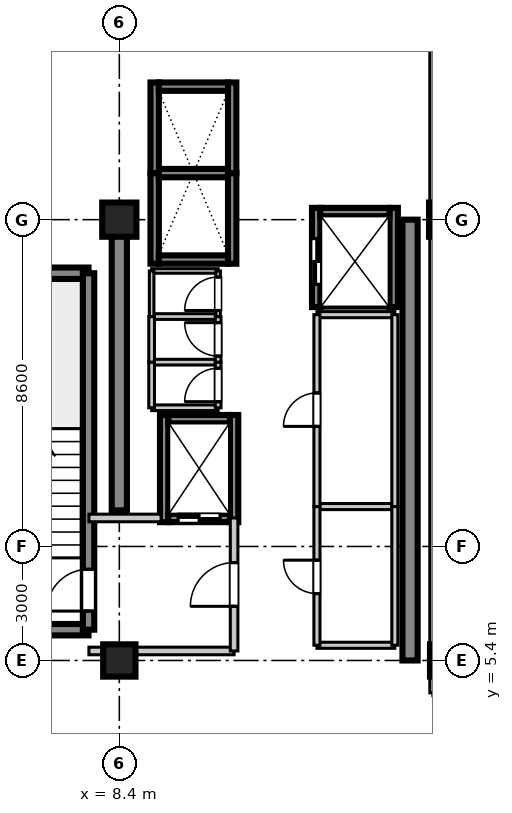
"""IFC4 building model, lengths in metres.
Left out: names, types, materials, properties, quantities, classifications, styles, units other than length and angle.
Written with IfcOpenShell. Run it as: python <this file> out.ifc"""

import sys

from ifc_helpers import new_model, si_unit, direction, frame, frame_2d, origin, origin_2d, place, context, subcontext, project, spatial, rectangle, extrude, source, transform, mapped, element, fill, save


model = new_model("IFC4")
c1 = context("Model", 3, precision=1e-05, world=origin(), true_north=direction((0.0, 1.0)))
c2 = subcontext(c1, "Body", "Model", "MODEL_VIEW")
j1 = project(units=[si_unit("LENGTHUNIT", "METRE"), si_unit("PLANEANGLEUNIT", "RADIAN")], contexts=[c1])
p1 = place(None, origin())
s1 = spatial("IfcSite", under=j1, at=p1, CompositionType="ELEMENT")
p2 = place(p1, origin())
s2 = spatial("IfcBuilding", under=s1, at=p2, CompositionType="ELEMENT")
p3 = place(p2, frame((0.0, 0.0, 327.15)))
s3 = spatial("IfcBuildingStorey", under=s2, at=p3, CompositionType="ELEMENT", Elevation=327.15)
m1 = source(origin(), c2, "Body", "SweptSolid", [
    extrude(rectangle(XDim=0.85, YDim=0.85, at=origin_2d()), origin(), (0.0, 0.0, 1.0), 3.755),
])
p4 = place(p3, frame((8.4, 5.4, 0.0), z_axis=(0.0, 0.0, 1.0), x_axis=(1.0, 0.0, 0.0)))
e1 = element("IfcColumn", 1, at=p4, inside=s3, PredefinedType="PILASTER", context=c2, shape_type="MappedRepresentation", body=[
    mapped(m1, transform((0.0, 0.0, 0.0), scale=1.0)),
])
m2 = source(origin(), c2, "Body", "SweptSolid", [
    extrude(rectangle(XDim=0.9, YDim=0.9, at=origin_2d()), origin(), (0.0, 0.0, 1.0), 3.755),
])
p5 = place(p3, frame((8.4, 17.0, 0.0), z_axis=(0.0, 0.0, 1.0), x_axis=(1.0, 0.0, 0.0)))
e2 = element("IfcColumn", 2, at=p5, inside=s3, PredefinedType="COLUMN", context=c2, shape_type="MappedRepresentation", body=[
    mapped(m2, transform((0.0, 0.0, 0.0), scale=1.0)),
])
p6 = place(p3, frame((17.0, 5.4, 0.0), z_axis=(0.0, 0.0, 1.0), x_axis=(1.0, 0.0, 0.0)))
e3 = element("IfcColumn", 3, at=p6, inside=s3, PredefinedType="PILASTER", context=c2, shape_type="MappedRepresentation", body=[
    mapped(m1, transform((0.0, 0.0, 0.0), scale=1.0)),
])
p7 = place(p3, frame((17.0, 17.0, 0.0), z_axis=(0.0, 0.0, 1.0), x_axis=(1.0, 0.0, 0.0)))
e4 = element("IfcColumn", 4, at=p7, inside=s3, PredefinedType="COLUMN", context=c2, shape_type="MappedRepresentation", body=[
    mapped(m2, transform((0.0, 0.0, 0.0), scale=1.0)),
])
m3 = source(origin(), c2, "Body", "SweptSolid", [
    extrude(rectangle(XDim=7.65, YDim=0.4, at=frame_2d((3.825, 0.0))), origin(), (0.0, 0.0, 1.0), 3.5),
])
p8 = place(p3, frame((8.4, 9.35, 0.0), z_axis=(0.0, 0.0, 1.0), x_axis=(0.0, 1.0, 0.0)))
e5 = element("IfcWall", 5, at=p8, inside=s3, PredefinedType="SHEAR", context=c2, shape_type="MappedRepresentation", body=[
    mapped(m3, transform((0.0, 0.0, 0.0), scale=1.0)),
])
m4 = source(origin(), c2, "Body", "SweptSolid", [
    extrude(rectangle(XDim=11.6, YDim=0.4, at=frame_2d((5.8, 0.0))), origin(), (0.0, 0.0, 1.0), 3.5),
])
p9 = place(p3, frame((16.05, 5.4, 0.0), z_axis=(0.0, 0.0, 1.0), x_axis=(0.0, 1.0, 0.0)))
e6 = element("IfcWall", 6, at=p9, inside=s3, PredefinedType="SHEAR", context=c2, shape_type="MappedRepresentation", body=[
    mapped(m4, transform((0.0, 0.0, 0.0), scale=1.0)),
])
m5 = source(origin(), c2, "Body", "SweptSolid", [
    extrude(rectangle(XDim=3.98, YDim=0.3, at=frame_2d((1.99, 0.0))), origin(), (0.0, 0.0, 1.0), 3.5),
])
for number, where, z_axis, x_axis in (
    (7, (3.61, 6.21, 0.0), (0.0, 0.0, 1.0), (1.0, 0.0, 0.0)),
    (8, (3.61, 15.59, 0.0), (0.0, 0.0, 1.0), (1.0, 0.0, 0.0)),
):
    element("IfcWall", number, at=place(p3, frame(where, z_axis=z_axis, x_axis=x_axis)), inside=s3, PredefinedType="SHEAR", context=c2, shape_type="MappedRepresentation", body=[
        mapped(m5, transform((0.0, 0.0, 0.0), scale=1.0)),
    ])
m6 = source(origin(), c2, "Body", "SweptSolid", [
    extrude(rectangle(XDim=9.38, YDim=0.3, at=frame_2d((4.69, 0.0))), origin(), (0.0, 0.0, 1.0), 3.5),
])
p10 = place(p3, frame((7.59, 6.21, 0.0), z_axis=(0.0, 0.0, 1.0), x_axis=(0.0, 1.0, 0.0)))
e9 = element("IfcWall", 9, at=p10, inside=s3, PredefinedType="SHEAR", context=c2, shape_type="MappedRepresentation", body=[
    mapped(m6, transform((0.0, 0.0, 0.0), scale=1.0)),
])
p11 = place(p10, frame((0.49, 0.0, 0.0)))
e10 = element("IfcOpeningElement", 10, at=p11, cuts=e9, PredefinedType="OPENING", context=c2, shape_type="SweptSolid", body=[
    extrude(rectangle(XDim=1.1, YDim=2.15, at=frame_2d((0.55, 1.075))), frame((0.0, 0.16, 0.0), z_axis=(0.0, -1.0, 0.0), x_axis=(1.0, 0.0, 0.0)), (0.0, 0.0, 1.0), 0.32),
])
m7 = source(origin(), c2, "Body", "SweptSolid", [
    extrude(rectangle(XDim=2.385, YDim=0.22, at=frame_2d((1.192, 0.0))), origin(), (0.0, 0.0, 1.0), 3.5),
])
for number, where, z_axis, x_axis in (
    (11, (9.33, 15.84, 0.0), (0.0, 0.0, 1.0), (0.0, 1.0, 0.0)),
    (12, (11.37, 15.84, 0.0), (0.0, 0.0, 1.0), (0.0, 1.0, 0.0)),
):
    element("IfcWall", number, at=place(p3, frame(where, z_axis=z_axis, x_axis=x_axis)), inside=s3, PredefinedType="SHEAR", context=c2, shape_type="MappedRepresentation", body=[
        mapped(m7, transform((0.0, 0.0, 0.0), scale=1.0)),
    ])
m8 = source(origin(), c2, "Body", "SweptSolid", [
    extrude(rectangle(XDim=1.82, YDim=0.22, at=frame_2d((0.91, 0.0))), origin(), (0.0, 0.0, 1.0), 3.5),
])
p12 = place(p3, frame((9.44, 15.95, 0.0), z_axis=(0.0, 0.0, 1.0), x_axis=(1.0, 0.0, 0.0)))
e13 = element("IfcWall", 13, at=p12, inside=s3, PredefinedType="SHEAR", context=c2, shape_type="MappedRepresentation", body=[
    mapped(m8, transform((0.0, 0.0, 0.0), scale=1.0)),
])
m9 = source(origin(), c2, "Body", "SweptSolid", [
    extrude(rectangle(XDim=1.82, YDim=0.22, at=frame_2d((0.91, 0.0))), origin(), (0.0, 0.0, 1.0), 3.8),
])
p13 = place(p3, frame((9.44, 18.225, 0.0), z_axis=(0.0, 0.0, 1.0), x_axis=(1.0, 0.0, 0.0)))
e14 = element("IfcWall", 14, at=p13, inside=s3, PredefinedType="SHEAR", context=c2, shape_type="MappedRepresentation", body=[
    mapped(m9, transform((0.0, 0.0, 0.0), scale=1.0)),
])
for number, where, z_axis, x_axis in (
    (15, (9.33, 18.225, 0.0), (0.0, 0.0, 1.0), (0.0, 1.0, 0.0)),
    (16, (11.37, 18.225, 0.0), (0.0, 0.0, 1.0), (0.0, 1.0, 0.0)),
):
    element("IfcWall", number, at=place(p3, frame(where, z_axis=z_axis, x_axis=x_axis)), inside=s3, PredefinedType="SHEAR", context=c2, shape_type="MappedRepresentation", body=[
        mapped(m7, transform((0.0, 0.0, 0.0), scale=1.0)),
    ])
p14 = place(p3, frame((9.44, 20.5, 0.0), z_axis=(0.0, 0.0, 1.0), x_axis=(1.0, 0.0, 0.0)))
e17 = element("IfcWall", 17, at=p14, inside=s3, PredefinedType="SHEAR", context=c2, shape_type="MappedRepresentation", body=[
    mapped(m8, transform((0.0, 0.0, 0.0), scale=1.0)),
])
m10 = source(origin(), c2, "Body", "SweptSolid", [
    extrude(rectangle(XDim=2.82, YDim=0.22, at=frame_2d((1.41, 0.0))), origin(), (0.0, 0.0, 1.0), 3.5),
])
for number, where, z_axis, x_axis in (
    (18, (9.58, 9.04, 0.0), (0.0, 0.0, 1.0), (0.0, 1.0, 0.0)),
    (19, (11.42, 9.04, 0.0), (0.0, 0.0, 1.0), (0.0, 1.0, 0.0)),
):
    element("IfcWall", number, at=place(p3, frame(where, z_axis=z_axis, x_axis=x_axis)), inside=s3, PredefinedType="SHEAR", context=c2, shape_type="MappedRepresentation", body=[
        mapped(m10, transform((0.0, 0.0, 0.0), scale=1.0)),
    ])
m11 = source(origin(), c2, "Body", "SweptSolid", [
    extrude(rectangle(XDim=1.62, YDim=0.22, at=frame_2d((0.81, 0.0))), origin(), (0.0, 0.0, 1.0), 3.5),
])
p15 = place(p3, frame((9.69, 9.15, 0.0), z_axis=(0.0, 0.0, 1.0), x_axis=(1.0, 0.0, 0.0)))
e20 = element("IfcWall", 20, at=p15, inside=s3, PredefinedType="SHEAR", context=c2, shape_type="MappedRepresentation", body=[
    mapped(m11, transform((0.0, 0.0, 0.0), scale=1.0)),
])
p16 = place(p15, frame((0.26, 0.0, 0.0)))
e21 = element("IfcOpeningElement", 21, at=p16, cuts=e20, PredefinedType="OPENING", context=c2, shape_type="SweptSolid", body=[
    extrude(rectangle(XDim=1.1, YDim=2.2, at=frame_2d((0.55, 1.1))), frame((0.0, 0.12, 0.0), z_axis=(0.0, -1.0, 0.0), x_axis=(1.0, 0.0, 0.0)), (0.0, 0.0, 1.0), 0.24),
])
p17 = place(p3, frame((9.69, 11.75, 0.0), z_axis=(0.0, 0.0, 1.0), x_axis=(1.0, 0.0, 0.0)))
e22 = element("IfcWall", 22, at=p17, inside=s3, PredefinedType="SHEAR", context=c2, shape_type="MappedRepresentation", body=[
    mapped(m11, transform((0.0, 0.0, 0.0), scale=1.0)),
])
m12 = source(origin(), c2, "Body", "SweptSolid", [
    extrude(rectangle(XDim=2.61, YDim=0.22, at=frame_2d((1.305, 0.0))), origin(), (0.0, 0.0, 1.0), 3.5),
])
p18 = place(p3, frame((13.58, 14.7, 0.0), z_axis=(0.0, 0.0, 1.0), x_axis=(0.0, 1.0, 0.0)))
e23 = element("IfcWall", 23, at=p18, inside=s3, PredefinedType="SHEAR", context=c2, shape_type="MappedRepresentation", body=[
    mapped(m12, transform((0.0, 0.0, 0.0), scale=1.0)),
])
p19 = place(p18, frame((0.6, 0.0, 0.0)))
e24 = element("IfcOpeningElement", 24, at=p19, cuts=e23, PredefinedType="OPENING", context=c2, shape_type="SweptSolid", body=[
    extrude(rectangle(XDim=1.2, YDim=2.2, at=frame_2d((0.6, 1.1))), frame((0.0, 0.12, 0.0), z_axis=(0.0, -1.0, 0.0), x_axis=(1.0, 0.0, 0.0)), (0.0, 0.0, 1.0), 0.24),
])
p20 = place(p3, frame((15.62, 14.7, 0.0), z_axis=(0.0, 0.0, 1.0), x_axis=(0.0, 1.0, 0.0)))
e25 = element("IfcWall", 25, at=p20, inside=s3, PredefinedType="SHEAR", context=c2, shape_type="MappedRepresentation", body=[
    mapped(m12, transform((0.0, 0.0, 0.0), scale=1.0)),
])
p21 = place(p3, frame((13.69, 17.2, 0.0), z_axis=(0.0, 0.0, 1.0), x_axis=(1.0, 0.0, 0.0)))
e26 = element("IfcWall", 26, at=p21, inside=s3, PredefinedType="SHEAR", context=c2, shape_type="MappedRepresentation", body=[
    mapped(m8, transform((0.0, 0.0, 0.0), scale=1.0)),
])
m13 = source(origin(), c2, "Body", "SweptSolid", [
    extrude(rectangle(XDim=3.82, YDim=0.2, at=frame_2d((1.91, 0.0))), origin(), (0.0, 0.0, 1.0), 2.84),
])
p22 = place(p3, frame((7.6, 5.65, 0.0), z_axis=(0.0, 0.0, 1.0), x_axis=(1.0, 0.0, 0.0)))
e27 = element("IfcWall", 27, at=p22, inside=s3, PredefinedType="PARTITIONING", context=c2, shape_type="MappedRepresentation", body=[
    mapped(m13, transform((0.0, 0.0, 0.0), scale=1.0)),
])
m14 = source(origin(), c2, "Body", "SweptSolid", [
    extrude(rectangle(XDim=1.9, YDim=0.2, at=frame_2d((0.95, 0.0))), origin(), (0.0, 0.0, 1.0), 2.84),
])
p23 = place(p3, frame((7.6, 9.15, 0.0), z_axis=(0.0, 0.0, 1.0), x_axis=(1.0, 0.0, 0.0)))
e28 = element("IfcWall", 28, at=p23, inside=s3, PredefinedType="PARTITIONING", context=c2, shape_type="MappedRepresentation", body=[
    mapped(m14, transform((0.0, 0.0, 0.0), scale=1.0)),
])
m15 = source(origin(), c2, "Body", "SweptSolid", [
    extrude(rectangle(XDim=3.5, YDim=0.2, at=frame_2d((1.75, 0.0))), origin(), (0.0, 0.0, 1.0), 2.84),
])
p24 = place(p3, frame((11.42, 5.65, 0.0), z_axis=(0.0, 0.0, 1.0), x_axis=(0.0, 1.0, 0.0)))
e29 = element("IfcWall", 29, at=p24, inside=s3, PredefinedType="PARTITIONING", context=c2, shape_type="MappedRepresentation", body=[
    mapped(m15, transform((0.0, 0.0, 0.0), scale=1.0)),
])
p25 = place(p24, frame((1.175, 0.0, 0.0)))
e30 = element("IfcOpeningElement", 30, at=p25, cuts=e29, PredefinedType="OPENING", context=c2, shape_type="SweptSolid", body=[
    extrude(rectangle(XDim=1.15, YDim=2.15, at=frame_2d((0.575, 1.075))), frame((0.0, 0.11, 0.0), z_axis=(0.0, -1.0, 0.0), x_axis=(1.0, 0.0, 0.0)), (0.0, 0.0, 1.0), 0.22),
])
m16 = source(origin(), c2, "Body", "SweptSolid", [
    extrude(rectangle(XDim=1.75, YDim=0.15, at=frame_2d((0.875, 0.0))), origin(), (0.0, 0.0, 1.0), 2.84),
])
for number, where, z_axis, x_axis in (
    (31, (9.25, 12.05, 0.0), (0.0, 0.0, 1.0), (1.0, 0.0, 0.0)),
    (32, (9.25, 13.25, 0.0), (0.0, 0.0, 1.0), (1.0, 0.0, 0.0)),
):
    element("IfcWall", number, at=place(p3, frame(where, z_axis=z_axis, x_axis=x_axis)), inside=s3, PredefinedType="PARTITIONING", context=c2, shape_type="MappedRepresentation", body=[
        mapped(m16, transform((0.0, 0.0, 0.0), scale=1.0)),
    ])
m17 = source(origin(), c2, "Body", "SweptSolid", [
    extrude(rectangle(XDim=1.2, YDim=0.15, at=frame_2d((0.6, 0.0))), origin(), (0.0, 0.0, 1.0), 2.84),
])
p26 = place(p3, frame((9.25, 12.05, 0.0), z_axis=(0.0, 0.0, 1.0), x_axis=(0.0, 1.0, 0.0)))
e33 = element("IfcWall", 33, at=p26, inside=s3, PredefinedType="PARTITIONING", context=c2, shape_type="MappedRepresentation", body=[
    mapped(m17, transform((0.0, 0.0, 0.0), scale=1.0)),
])
p27 = place(p3, frame((11.0, 12.05, 0.0), z_axis=(0.0, 0.0, 1.0), x_axis=(0.0, 1.0, 0.0)))
e34 = element("IfcWall", 34, at=p27, inside=s3, PredefinedType="PARTITIONING", context=c2, shape_type="MappedRepresentation", body=[
    mapped(m17, transform((0.0, 0.0, 0.0), scale=1.0)),
])
p28 = place(p27, frame((0.16, 0.0, 0.0)))
e35 = element("IfcOpeningElement", 35, at=p28, cuts=e34, PredefinedType="OPENING", context=c2, shape_type="SweptSolid", body=[
    extrude(rectangle(XDim=0.88, YDim=2.1, at=frame_2d((0.44, 1.05))), frame((0.0, 0.085, 0.0), z_axis=(0.0, -1.0, 0.0), x_axis=(1.0, 0.0, 0.0)), (0.0, 0.0, 1.0), 0.17),
])
p29 = place(p3, frame((9.25, 14.45, 0.0), z_axis=(0.0, 0.0, 1.0), x_axis=(1.0, 0.0, 0.0)))
e36 = element("IfcWall", 36, at=p29, inside=s3, PredefinedType="PARTITIONING", context=c2, shape_type="MappedRepresentation", body=[
    mapped(m16, transform((0.0, 0.0, 0.0), scale=1.0)),
])
p30 = place(p3, frame((9.25, 13.25, 0.0), z_axis=(0.0, 0.0, 1.0), x_axis=(0.0, 1.0, 0.0)))
e37 = element("IfcWall", 37, at=p30, inside=s3, PredefinedType="PARTITIONING", context=c2, shape_type="MappedRepresentation", body=[
    mapped(m17, transform((0.0, 0.0, 0.0), scale=1.0)),
])
p31 = place(p3, frame((11.0, 13.25, 0.0), z_axis=(0.0, 0.0, 1.0), x_axis=(0.0, 1.0, 0.0)))
e38 = element("IfcWall", 38, at=p31, inside=s3, PredefinedType="PARTITIONING", context=c2, shape_type="MappedRepresentation", body=[
    mapped(m17, transform((0.0, 0.0, 0.0), scale=1.0)),
])
p32 = place(p31, frame((0.16, 0.0, 0.0)))
e39 = element("IfcOpeningElement", 39, at=p32, cuts=e38, PredefinedType="OPENING", context=c2, shape_type="SweptSolid", body=[
    extrude(rectangle(XDim=0.88, YDim=2.1, at=frame_2d((0.44, 1.05))), frame((0.0, 0.085, 0.0), z_axis=(0.0, -1.0, 0.0), x_axis=(1.0, 0.0, 0.0)), (0.0, 0.0, 1.0), 0.17),
])
m18 = source(origin(), c2, "Body", "SweptSolid", [
    extrude(rectangle(XDim=1.75, YDim=0.12, at=frame_2d((0.875, 0.0))), origin(), (0.0, 0.0, 1.0), 2.84),
])
p33 = place(p3, frame((9.25, 15.65, 0.0), z_axis=(0.0, 0.0, 1.0), x_axis=(1.0, 0.0, 0.0)))
e40 = element("IfcWall", 40, at=p33, inside=s3, PredefinedType="PARTITIONING", context=c2, shape_type="MappedRepresentation", body=[
    mapped(m18, transform((0.0, 0.0, 0.0), scale=1.0)),
])
m19 = source(origin(), c2, "Body", "SweptSolid", [
    extrude(rectangle(XDim=1.2, YDim=0.12, at=frame_2d((0.6, 0.0))), origin(), (0.0, 0.0, 1.0), 2.84),
])
p34 = place(p3, frame((9.25, 14.45, 0.0), z_axis=(0.0, 0.0, 1.0), x_axis=(0.0, 1.0, 0.0)))
e41 = element("IfcWall", 41, at=p34, inside=s3, PredefinedType="PARTITIONING", context=c2, shape_type="MappedRepresentation", body=[
    mapped(m19, transform((0.0, 0.0, 0.0), scale=1.0)),
])
p35 = place(p3, frame((11.0, 14.45, 0.0), z_axis=(0.0, 0.0, 1.0), x_axis=(0.0, 1.0, 0.0)))
e42 = element("IfcWall", 42, at=p35, inside=s3, PredefinedType="PARTITIONING", context=c2, shape_type="MappedRepresentation", body=[
    mapped(m19, transform((0.0, 0.0, 0.0), scale=1.0)),
])
p36 = place(p35, frame((0.16, 0.0, 0.0)))
e43 = element("IfcOpeningElement", 43, at=p36, cuts=e42, PredefinedType="OPENING", context=c2, shape_type="SweptSolid", body=[
    extrude(rectangle(XDim=0.88, YDim=2.1, at=frame_2d((0.44, 1.05))), frame((0.0, 0.07, 0.0), z_axis=(0.0, -1.0, 0.0), x_axis=(1.0, 0.0, 0.0)), (0.0, 0.0, 1.0), 0.14),
])
m20 = source(origin(), c2, "Body", "SweptSolid", [
    extrude(rectangle(XDim=2.05, YDim=0.16, at=frame_2d((1.025, 0.0))), origin(), (0.0, 0.0, 1.0), 2.84),
])
for number, where, z_axis, x_axis in (
    (44, (13.6, 5.8, 0.0), (0.0, 0.0, 1.0), (1.0, 0.0, 0.0)),
    (45, (13.6, 9.45, 0.0), (0.0, 0.0, 1.0), (1.0, 0.0, 0.0)),
):
    element("IfcWall", number, at=place(p3, frame(where, z_axis=z_axis, x_axis=x_axis)), inside=s3, PredefinedType="PARTITIONING", context=c2, shape_type="MappedRepresentation", body=[
        mapped(m20, transform((0.0, 0.0, 0.0), scale=1.0)),
    ])
m21 = source(origin(), c2, "Body", "SweptSolid", [
    extrude(rectangle(XDim=3.65, YDim=0.16, at=frame_2d((1.825, 0.0))), origin(), (0.0, 0.0, 1.0), 2.84),
])
p37 = place(p3, frame((13.6, 5.8, 0.0), z_axis=(0.0, 0.0, 1.0), x_axis=(0.0, 1.0, 0.0)))
e46 = element("IfcWall", 46, at=p37, inside=s3, PredefinedType="PARTITIONING", context=c2, shape_type="MappedRepresentation", body=[
    mapped(m21, transform((0.0, 0.0, 0.0), scale=1.0)),
])
p38 = place(p37, frame((1.36, 0.0, 0.0)))
e47 = element("IfcOpeningElement", 47, at=p38, cuts=e46, PredefinedType="OPENING", context=c2, shape_type="SweptSolid", body=[
    extrude(rectangle(XDim=0.88, YDim=2.1, at=frame_2d((0.44, 1.05))), frame((0.0, 0.09, 0.0), z_axis=(0.0, -1.0, 0.0), x_axis=(1.0, 0.0, 0.0)), (0.0, 0.0, 1.0), 0.18),
])
p39 = place(p3, frame((15.65, 5.8, 0.0), z_axis=(0.0, 0.0, 1.0), x_axis=(0.0, 1.0, 0.0)))
e48 = element("IfcWall", 48, at=p39, inside=s3, PredefinedType="PARTITIONING", context=c2, shape_type="MappedRepresentation", body=[
    mapped(m21, transform((0.0, 0.0, 0.0), scale=1.0)),
])
p40 = place(p3, frame((13.6, 14.5, 0.0), z_axis=(0.0, 0.0, 1.0), x_axis=(1.0, 0.0, 0.0)))
e49 = element("IfcWall", 49, at=p40, inside=s3, PredefinedType="PARTITIONING", context=c2, shape_type="MappedRepresentation", body=[
    mapped(m20, transform((0.0, 0.0, 0.0), scale=1.0)),
])
m22 = source(origin(), c2, "Body", "SweptSolid", [
    extrude(rectangle(XDim=5.05, YDim=0.16, at=frame_2d((2.525, 0.0))), origin(), (0.0, 0.0, 1.0), 2.84),
])
p41 = place(p3, frame((13.6, 9.45, 0.0), z_axis=(0.0, 0.0, 1.0), x_axis=(0.0, 1.0, 0.0)))
e50 = element("IfcWall", 50, at=p41, inside=s3, PredefinedType="PARTITIONING", context=c2, shape_type="MappedRepresentation", body=[
    mapped(m22, transform((0.0, 0.0, 0.0), scale=1.0)),
])
p42 = place(p41, frame((2.11, 0.0, 0.0)))
e51 = element("IfcOpeningElement", 51, at=p42, cuts=e50, PredefinedType="OPENING", context=c2, shape_type="SweptSolid", body=[
    extrude(rectangle(XDim=0.88, YDim=2.1, at=frame_2d((0.44, 1.05))), frame((0.0, 0.09, 0.0), z_axis=(0.0, -1.0, 0.0), x_axis=(1.0, 0.0, 0.0)), (0.0, 0.0, 1.0), 0.18),
])
p43 = place(p3, frame((15.65, 9.45, 0.0), z_axis=(0.0, 0.0, 1.0), x_axis=(0.0, 1.0, 0.0)))
e52 = element("IfcWall", 52, at=p43, inside=s3, PredefinedType="PARTITIONING", context=c2, shape_type="MappedRepresentation", body=[
    mapped(m22, transform((0.0, 0.0, 0.0), scale=1.0)),
])
m23 = source(origin(), c2, "Body", "SweptSolid", [
    extrude(rectangle(XDim=17.95, YDim=0.16, at=frame_2d((8.975, 0.0))), origin(), (0.0, 0.0, 1.0), 2.84),
])
p44 = place(p3, frame((16.65, 4.55, 0.0), z_axis=(0.0, 0.0, 1.0), x_axis=(0.0, 1.0, 0.0)))
e53 = element("IfcWall", 53, at=p44, inside=s3, PredefinedType="PARTITIONING", context=c2, shape_type="MappedRepresentation", body=[
    mapped(m23, transform((0.0, 0.0, 0.0), scale=1.0)),
])
m24 = source(origin(), c2, "Body", "SweptSolid", [
    extrude(rectangle(XDim=1.1, YDim=2.15, at=frame_2d((0.55, 1.075))), frame((0.0, 0.025, 0.0), z_axis=(0.0, -1.0, 0.0), x_axis=(1.0, 0.0, 0.0)), (0.0, 0.0, 1.0), 0.05),
])
p45 = place(p11, origin())
e54 = element("IfcDoor", 54, at=p45, inside=s3, OperationType="SINGLE_SWING_LEFT", PredefinedType="DOOR", context=c2, shape_type="MappedRepresentation", body=[
    mapped(m24, transform((0.0, 0.0, 0.0), scale=1.0)),
])
fill(e10, e54)
m25 = source(origin(), c2, "Body", "SweptSolid", [
    extrude(rectangle(XDim=1.1, YDim=2.2, at=frame_2d((0.55, 1.1))), frame((0.0, 0.025, 0.0), z_axis=(0.0, -1.0, 0.0), x_axis=(1.0, 0.0, 0.0)), (0.0, 0.0, 1.0), 0.05),
])
p46 = place(p16, frame((1.1, 0.0, 0.0), z_axis=(0.0, 0.0, 1.0), x_axis=(-1.0, 0.0, 0.0)))
e55 = element("IfcDoor", 55, at=p46, inside=s3, OperationType="DOUBLE_DOOR_SLIDING", PredefinedType="DOOR", context=c2, shape_type="MappedRepresentation", body=[
    mapped(m25, transform((0.0, 0.0, 0.0), scale=1.0)),
])
fill(e21, e55)
m26 = source(origin(), c2, "Body", "SweptSolid", [
    extrude(rectangle(XDim=1.2, YDim=2.2, at=frame_2d((0.6, 1.1))), frame((0.0, 0.025, 0.0), z_axis=(0.0, -1.0, 0.0), x_axis=(1.0, 0.0, 0.0)), (0.0, 0.0, 1.0), 0.05),
])
p47 = place(p19, origin())
e56 = element("IfcDoor", 56, at=p47, inside=s3, OperationType="DOUBLE_DOOR_SLIDING", PredefinedType="DOOR", context=c2, shape_type="MappedRepresentation", body=[
    mapped(m26, transform((0.0, 0.0, 0.0), scale=1.0)),
])
fill(e24, e56)
m27 = source(origin(), c2, "Body", "SweptSolid", [
    extrude(rectangle(XDim=1.15, YDim=2.15, at=frame_2d((0.575, 1.075))), frame((0.0, 0.025, 0.0), z_axis=(0.0, -1.0, 0.0), x_axis=(1.0, 0.0, 0.0)), (0.0, 0.0, 1.0), 0.05),
])
p48 = place(p25, frame((1.15, 0.0, 0.0), z_axis=(0.0, 0.0, 1.0), x_axis=(-1.0, 0.0, 0.0)))
e57 = element("IfcDoor", 57, at=p48, inside=s3, OperationType="SINGLE_SWING_LEFT", PredefinedType="DOOR", context=c2, shape_type="MappedRepresentation", body=[
    mapped(m27, transform((0.0, 0.0, 0.0), scale=1.0)),
])
fill(e30, e57)
m28 = source(origin(), c2, "Body", "SweptSolid", [
    extrude(rectangle(XDim=0.88, YDim=2.1, at=frame_2d((0.44, 1.05))), frame((0.0, 0.025, 0.0), z_axis=(0.0, -1.0, 0.0), x_axis=(1.0, 0.0, 0.0)), (0.0, 0.0, 1.0), 0.05),
])
p49 = place(p28, origin())
e58 = element("IfcDoor", 58, at=p49, inside=s3, OperationType="SINGLE_SWING_LEFT", PredefinedType="DOOR", context=c2, shape_type="MappedRepresentation", body=[
    mapped(m28, transform((0.0, 0.0, 0.0), scale=1.0)),
])
fill(e35, e58)
p50 = place(p32, origin())
e59 = element("IfcDoor", 59, at=p50, inside=s3, OperationType="SINGLE_SWING_RIGHT", PredefinedType="DOOR", context=c2, shape_type="MappedRepresentation", body=[
    mapped(m28, transform((0.0, 0.0, 0.0), scale=1.0)),
])
fill(e39, e59)
p51 = place(p36, origin())
e60 = element("IfcDoor", 60, at=p51, inside=s3, OperationType="SINGLE_SWING_LEFT", PredefinedType="DOOR", context=c2, shape_type="MappedRepresentation", body=[
    mapped(m28, transform((0.0, 0.0, 0.0), scale=1.0)),
])
fill(e43, e60)
p52 = place(p38, frame((0.88, 0.0, 0.0), z_axis=(0.0, 0.0, 1.0), x_axis=(-1.0, 0.0, 0.0)))
e61 = element("IfcDoor", 61, at=p52, inside=s3, OperationType="SINGLE_SWING_RIGHT", PredefinedType="DOOR", context=c2, shape_type="MappedRepresentation", body=[
    mapped(m28, transform((0.0, 0.0, 0.0), scale=1.0)),
])
fill(e47, e61)
p53 = place(p42, frame((0.88, 0.0, 0.0), z_axis=(0.0, 0.0, 1.0), x_axis=(-1.0, 0.0, 0.0)))
e62 = element("IfcDoor", 62, at=p53, inside=s3, OperationType="SINGLE_SWING_LEFT", PredefinedType="DOOR", context=c2, shape_type="MappedRepresentation", body=[
    mapped(m28, transform((0.0, 0.0, 0.0), scale=1.0)),
])
fill(e51, e62)
save(model, sys.argv[1])
